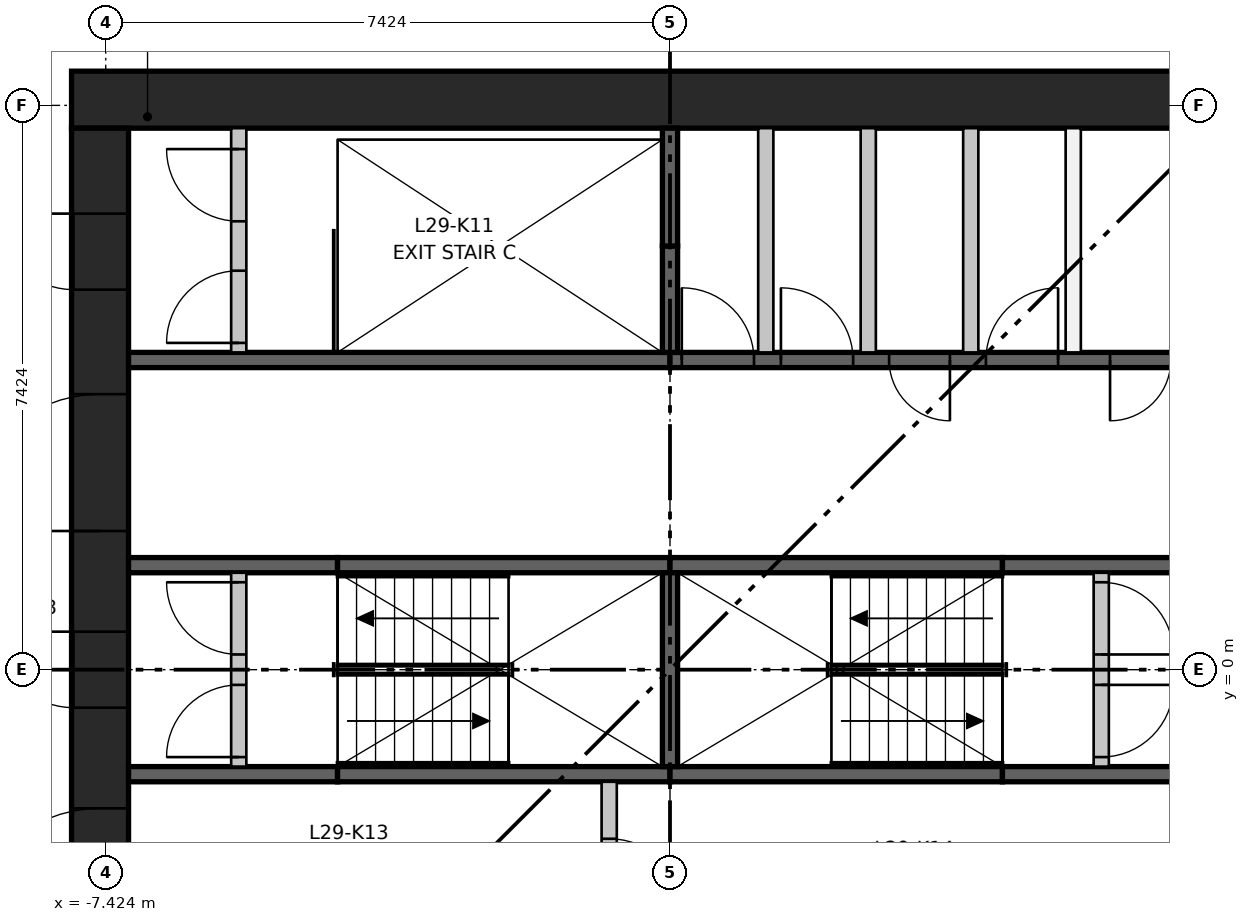
"""IFC4 building model, lengths in metres.
Left out: names, types, materials, properties, quantities, classifications, styles, units other than length and angle.
Written with IfcOpenShell. Run it as: python <this file> out.ifc"""

import sys

from ifc_helpers import new_model, si_unit, direction, frame, frame_2d, origin, place, context, subcontext, project, spatial, rectangle, extrude, element, fill, save


model = new_model("IFC4")
c1 = context("Model", 3, precision=1e-05, world=origin(), true_north=direction((0.0, 1.0)))
c2 = subcontext(c1, "Body", "Model", "MODEL_VIEW")
j1 = project(units=[si_unit("LENGTHUNIT", "METRE"), si_unit("PLANEANGLEUNIT", "RADIAN")], contexts=[c1])
p1 = place(None, origin())
s1 = spatial("IfcSite", under=j1, at=p1, CompositionType="ELEMENT")
p2 = place(p1, origin())
s2 = spatial("IfcBuilding", under=s1, at=p2, CompositionType="ELEMENT")
p3 = place(p2, frame((0.0, 0.0, 112.9)))
s3 = spatial("IfcBuildingStorey", under=s2, at=p3, CompositionType="ELEMENT", Elevation=112.9)
p4 = place(p3, frame((-7.874, 7.499, 0.0), z_axis=(0.0, 0.0, 1.0), x_axis=(1.0, 0.0, 0.0)))
e1 = element("IfcWall", 1, at=p4, inside=s3, PredefinedType="SHEAR", context=c2, shape_type="SweptSolid", body=[
    extrude(rectangle(XDim=15.748, YDim=0.75, at=frame_2d((7.874, 0.0))), origin(), (0.0, 0.0, 1.0), 3.65),
])
p5 = place(p3, frame((-7.499, -7.124, 0.0), z_axis=(0.0, 0.0, 1.0), x_axis=(0.0, 1.0, 0.0)))
e2 = element("IfcWall", 2, at=p5, inside=s3, PredefinedType="SHEAR", context=c2, shape_type="SweptSolid", body=[
    extrude(rectangle(XDim=14.248, YDim=0.75, at=frame_2d((7.124, 0.0))), origin(), (0.0, 0.0, 1.0), 3.65),
])
p6 = place(p5, frame((6.624, 0.0, 0.0)))
e3 = element("IfcOpeningElement", 3, at=p6, cuts=e2, PredefinedType="OPENING", context=c2, shape_type="SweptSolid", body=[
    extrude(rectangle(XDim=1.0, YDim=2.1, at=frame_2d((0.5, 1.05))), frame((0.0, 0.385, 0.0), z_axis=(0.0, -1.0, 0.0), x_axis=(1.0, 0.0, 0.0)), (0.0, 0.0, 1.0), 0.77),
])
p7 = place(p5, frame((3.5, 0.0, 0.0)))
e4 = element("IfcOpeningElement", 4, at=p7, cuts=e2, PredefinedType="OPENING", context=c2, shape_type="SweptSolid", body=[
    extrude(rectangle(XDim=1.8, YDim=2.1, at=frame_2d((0.9, 1.05))), frame((0.0, 0.385, 0.0), z_axis=(0.0, -1.0, 0.0), x_axis=(1.0, 0.0, 0.0)), (0.0, 0.0, 1.0), 0.77),
])
p8 = place(p5, frame((8.948, 0.0, 0.0)))
e5 = element("IfcOpeningElement", 5, at=p8, cuts=e2, PredefinedType="OPENING", context=c2, shape_type="SweptSolid", body=[
    extrude(rectangle(XDim=1.8, YDim=2.1, at=frame_2d((0.9, 1.05))), frame((0.0, 0.385, 0.0), z_axis=(0.0, -1.0, 0.0), x_axis=(1.0, 0.0, 0.0)), (0.0, 0.0, 1.0), 0.77),
])
p9 = place(p5, frame((12.124, 0.0, 0.0)))
e6 = element("IfcOpeningElement", 6, at=p9, cuts=e2, PredefinedType="OPENING", context=c2, shape_type="SweptSolid", body=[
    extrude(rectangle(XDim=1.0, YDim=2.1, at=frame_2d((0.5, 1.05))), frame((0.0, 0.385, 0.0), z_axis=(0.0, -1.0, 0.0), x_axis=(1.0, 0.0, 0.0)), (0.0, 0.0, 1.0), 0.77),
])
p10 = place(p3, frame((-7.124, 4.074, 0.0), z_axis=(0.0, 0.0, 1.0), x_axis=(1.0, 0.0, 0.0)))
e7 = element("IfcWall", 7, at=p10, inside=s3, PredefinedType="SHEAR", context=c2, shape_type="SweptSolid", body=[
    extrude(rectangle(XDim=7.124, YDim=0.2, at=frame_2d((3.562, 0.0))), origin(), (0.0, 0.0, 1.0), 3.3),
])
p11 = place(p3, frame((0.0, 4.074, 0.0), z_axis=(0.0, 0.0, 1.0), x_axis=(1.0, 0.0, 0.0)))
e8 = element("IfcWall", 8, at=p11, inside=s3, PredefinedType="SHEAR", context=c2, shape_type="SweptSolid", body=[
    extrude(rectangle(XDim=7.124, YDim=0.2, at=frame_2d((3.562, 0.0))), origin(), (0.0, 0.0, 1.0), 3.3),
])
p12 = place(p11, frame((0.155, 0.0, 0.0)))
e9 = element("IfcOpeningElement", 9, at=p12, cuts=e8, PredefinedType="OPENING", context=c2, shape_type="SweptSolid", body=[
    extrude(rectangle(XDim=0.95, YDim=2.1, at=frame_2d((0.475, 1.05))), frame((0.0, 0.11, 0.0), z_axis=(0.0, -1.0, 0.0), x_axis=(1.0, 0.0, 0.0)), (0.0, 0.0, 1.0), 0.22),
])
p13 = place(p11, frame((1.459, 0.0, 0.0)))
e10 = element("IfcOpeningElement", 10, at=p13, cuts=e8, PredefinedType="OPENING", context=c2, shape_type="SweptSolid", body=[
    extrude(rectangle(XDim=0.95, YDim=2.1, at=frame_2d((0.475, 1.05))), frame((0.0, 0.11, 0.0), z_axis=(0.0, -1.0, 0.0), x_axis=(1.0, 0.0, 0.0)), (0.0, 0.0, 1.0), 0.22),
])
p14 = place(p11, frame((2.883, 0.0, 0.0)))
e11 = element("IfcOpeningElement", 11, at=p14, cuts=e8, PredefinedType="OPENING", context=c2, shape_type="SweptSolid", body=[
    extrude(rectangle(XDim=0.8, YDim=2.1, at=frame_2d((0.4, 1.05))), frame((0.0, 0.11, 0.0), z_axis=(0.0, -1.0, 0.0), x_axis=(1.0, 0.0, 0.0)), (0.0, 0.0, 1.0), 0.22),
])
p15 = place(p11, frame((4.156, 0.0, 0.0)))
e12 = element("IfcOpeningElement", 12, at=p15, cuts=e8, PredefinedType="OPENING", context=c2, shape_type="SweptSolid", body=[
    extrude(rectangle(XDim=0.95, YDim=2.1, at=frame_2d((0.475, 1.05))), frame((0.0, 0.11, 0.0), z_axis=(0.0, -1.0, 0.0), x_axis=(1.0, 0.0, 0.0)), (0.0, 0.0, 1.0), 0.22),
])
p16 = place(p11, frame((5.79, 0.0, 0.0)))
e13 = element("IfcOpeningElement", 13, at=p16, cuts=e8, PredefinedType="OPENING", context=c2, shape_type="SweptSolid", body=[
    extrude(rectangle(XDim=0.8, YDim=2.1, at=frame_2d((0.4, 1.05))), frame((0.0, 0.11, 0.0), z_axis=(0.0, -1.0, 0.0), x_axis=(1.0, 0.0, 0.0)), (0.0, 0.0, 1.0), 0.22),
])
p17 = place(p3, frame((-7.124, -1.375, 0.0), z_axis=(0.0, 0.0, 1.0), x_axis=(1.0, 0.0, 0.0)))
e14 = element("IfcWall", 14, at=p17, inside=s3, PredefinedType="SHEAR", context=c2, shape_type="SweptSolid", body=[
    extrude(rectangle(XDim=2.75, YDim=0.2, at=frame_2d((1.375, 0.0))), origin(), (0.0, 0.0, 1.0), 3.3),
])
for number, where, z_axis, x_axis in (
    (15, (-4.374, -1.375, 0.0), (0.0, 0.0, 1.0), (1.0, 0.0, 0.0)),
    (16, (0.0, -1.375, 0.0), (0.0, 0.0, 1.0), (1.0, 0.0, 0.0)),
):
    element("IfcWall", number, at=place(p3, frame(where, z_axis=z_axis, x_axis=x_axis)), inside=s3, PredefinedType="SHEAR", context=c2, shape_type="SweptSolid", body=[
        extrude(rectangle(XDim=4.374, YDim=0.2, at=frame_2d((2.187, 0.0))), origin(), (0.0, 0.0, 1.0), 3.3),
    ])
for number, where, z_axis, x_axis in (
    (17, (4.374, -1.375, 0.0), (0.0, 0.0, 1.0), (1.0, 0.0, 0.0)),
    (18, (-7.124, 1.375, 0.0), (0.0, 0.0, 1.0), (1.0, 0.0, 0.0)),
):
    element("IfcWall", number, at=place(p3, frame(where, z_axis=z_axis, x_axis=x_axis)), inside=s3, PredefinedType="SHEAR", context=c2, shape_type="SweptSolid", body=[
        extrude(rectangle(XDim=2.75, YDim=0.2, at=frame_2d((1.375, 0.0))), origin(), (0.0, 0.0, 1.0), 3.3),
    ])
for number, where, z_axis, x_axis in (
    (19, (-4.374, 1.375, 0.0), (0.0, 0.0, 1.0), (1.0, 0.0, 0.0)),
    (20, (0.0, 1.375, 0.0), (0.0, 0.0, 1.0), (1.0, 0.0, 0.0)),
):
    element("IfcWall", number, at=place(p3, frame(where, z_axis=z_axis, x_axis=x_axis)), inside=s3, PredefinedType="SHEAR", context=c2, shape_type="SweptSolid", body=[
        extrude(rectangle(XDim=4.374, YDim=0.2, at=frame_2d((2.187, 0.0))), origin(), (0.0, 0.0, 1.0), 3.3),
    ])
p18 = place(p3, frame((4.374, 1.375, 0.0), z_axis=(0.0, 0.0, 1.0), x_axis=(1.0, 0.0, 0.0)))
e21 = element("IfcWall", 21, at=p18, inside=s3, PredefinedType="SHEAR", context=c2, shape_type="SweptSolid", body=[
    extrude(rectangle(XDim=2.75, YDim=0.2, at=frame_2d((1.375, 0.0))), origin(), (0.0, 0.0, 1.0), 3.3),
])
p19 = place(p3, frame((0.0, -1.275, 0.0), z_axis=(0.0, 0.0, 1.0), x_axis=(0.0, 1.0, 0.0)))
e22 = element("IfcWall", 22, at=p19, inside=s3, PredefinedType="SHEAR", context=c2, shape_type="SweptSolid", body=[
    extrude(rectangle(XDim=2.55, YDim=0.2, at=frame_2d((1.275, 0.0))), origin(), (0.0, 0.0, 1.0), 3.3),
])
p20 = place(p3, frame((-0.8, -3.974, 0.0), z_axis=(0.0, 0.0, 1.0), x_axis=(0.0, 1.0, 0.0)))
e23 = element("IfcWall", 23, at=p20, inside=s3, PredefinedType="PARTITIONING", context=c2, shape_type="SweptSolid", body=[
    extrude(rectangle(XDim=2.499, YDim=0.2, at=frame_2d((1.25, 0.0))), origin(), (0.0, 0.0, 1.0), 3.3),
])
p21 = place(p20, frame((0.75, 0.0, 0.0)))
e24 = element("IfcOpeningElement", 24, at=p21, cuts=e23, PredefinedType="OPENING", context=c2, shape_type="SweptSolid", body=[
    extrude(rectangle(XDim=1.0, YDim=2.1, at=frame_2d((0.5, 1.05))), frame((0.0, 0.11, 0.0), z_axis=(0.0, -1.0, 0.0), x_axis=(1.0, 0.0, 0.0)), (0.0, 0.0, 1.0), 0.22),
])
p22 = place(p3, frame((0.0, 4.174, 0.0), z_axis=(0.0, 0.0, 1.0), x_axis=(0.0, 1.0, 0.0)))
e25 = element("IfcWall", 25, at=p22, inside=s3, PredefinedType="SHEAR", context=c2, shape_type="SweptSolid", body=[
    extrude(rectangle(XDim=1.4, YDim=0.2, at=frame_2d((0.7, 0.0))), origin(), (0.0, 0.0, 1.0), 3.3),
])
p23 = place(p3, frame((0.0, 5.574, 0.0), z_axis=(0.0, 0.0, 1.0), x_axis=(0.0, 1.0, 0.0)))
e26 = element("IfcWall", 26, at=p23, inside=s3, PredefinedType="SHEAR", context=c2, shape_type="SweptSolid", body=[
    extrude(rectangle(XDim=1.55, YDim=0.2, at=frame_2d((0.775, 0.0))), origin(), (0.0, 0.0, 1.0), 3.3),
])
for number, where, z_axis, x_axis in (
    (27, (1.26, 4.174, 0.0), (0.0, 0.0, 1.0), (0.0, 1.0, 0.0)),
    (28, (2.609, 4.174, 0.0), (0.0, 0.0, 1.0), (0.0, 1.0, 0.0)),
    (29, (3.957, 4.174, 0.0), (0.0, 0.0, 1.0), (0.0, 1.0, 0.0)),
    (30, (5.305, 4.174, 0.0), (0.0, 0.0, 1.0), (0.0, 1.0, 0.0)),
):
    element("IfcWall", number, at=place(p3, frame(where, z_axis=z_axis, x_axis=x_axis)), inside=s3, PredefinedType="PARTITIONING", context=c2, shape_type="SweptSolid", body=[
        extrude(rectangle(XDim=2.95, YDim=0.2, at=frame_2d((1.475, 0.0))), origin(), (0.0, 0.0, 1.0), 3.3),
    ])
p24 = place(p3, frame((-5.674, -1.275, 0.0), z_axis=(0.0, 0.0, 1.0), x_axis=(0.0, 1.0, 0.0)))
e31 = element("IfcWall", 31, at=p24, inside=s3, PredefinedType="PARTITIONING", context=c2, shape_type="SweptSolid", body=[
    extrude(rectangle(XDim=2.55, YDim=0.2, at=frame_2d((1.275, 0.0))), origin(), (0.0, 0.0, 1.0), 3.3),
])
p25 = place(p24, frame((0.125, 0.0, 0.0)))
e32 = element("IfcOpeningElement", 32, at=p25, cuts=e31, PredefinedType="OPENING", context=c2, shape_type="SweptSolid", body=[
    extrude(rectangle(XDim=0.95, YDim=2.1, at=frame_2d((0.475, 1.05))), frame((0.0, 0.11, 0.0), z_axis=(0.0, -1.0, 0.0), x_axis=(1.0, 0.0, 0.0)), (0.0, 0.0, 1.0), 0.22),
])
p26 = place(p24, frame((1.475, 0.0, 0.0)))
e33 = element("IfcOpeningElement", 33, at=p26, cuts=e31, PredefinedType="OPENING", context=c2, shape_type="SweptSolid", body=[
    extrude(rectangle(XDim=0.95, YDim=2.1, at=frame_2d((0.475, 1.05))), frame((0.0, 0.11, 0.0), z_axis=(0.0, -1.0, 0.0), x_axis=(1.0, 0.0, 0.0)), (0.0, 0.0, 1.0), 0.22),
])
p27 = place(p3, frame((5.674, -1.275, 0.0), z_axis=(0.0, 0.0, 1.0), x_axis=(0.0, 1.0, 0.0)))
e34 = element("IfcWall", 34, at=p27, inside=s3, PredefinedType="PARTITIONING", context=c2, shape_type="SweptSolid", body=[
    extrude(rectangle(XDim=2.55, YDim=0.2, at=frame_2d((1.275, 0.0))), origin(), (0.0, 0.0, 1.0), 3.3),
])
p28 = place(p27, frame((0.125, 0.0, 0.0)))
e35 = element("IfcOpeningElement", 35, at=p28, cuts=e34, PredefinedType="OPENING", context=c2, shape_type="SweptSolid", body=[
    extrude(rectangle(XDim=0.95, YDim=2.1, at=frame_2d((0.475, 1.05))), frame((0.0, 0.11, 0.0), z_axis=(0.0, -1.0, 0.0), x_axis=(1.0, 0.0, 0.0)), (0.0, 0.0, 1.0), 0.22),
])
p29 = place(p27, frame((1.475, 0.0, 0.0)))
e36 = element("IfcOpeningElement", 36, at=p29, cuts=e34, PredefinedType="OPENING", context=c2, shape_type="SweptSolid", body=[
    extrude(rectangle(XDim=0.95, YDim=2.1, at=frame_2d((0.475, 1.05))), frame((0.0, 0.11, 0.0), z_axis=(0.0, -1.0, 0.0), x_axis=(1.0, 0.0, 0.0)), (0.0, 0.0, 1.0), 0.22),
])
p30 = place(p3, frame((-5.674, 4.174, 0.0), z_axis=(0.0, 0.0, 1.0), x_axis=(0.0, 1.0, 0.0)))
e37 = element("IfcWall", 37, at=p30, inside=s3, PredefinedType="PARTITIONING", context=c2, shape_type="SweptSolid", body=[
    extrude(rectangle(XDim=2.95, YDim=0.2, at=frame_2d((1.475, 0.0))), origin(), (0.0, 0.0, 1.0), 3.3),
])
p31 = place(p30, frame((0.125, 0.0, 0.0)))
e38 = element("IfcOpeningElement", 38, at=p31, cuts=e37, PredefinedType="OPENING", context=c2, shape_type="SweptSolid", body=[
    extrude(rectangle(XDim=0.95, YDim=2.1, at=frame_2d((0.475, 1.05))), frame((0.0, 0.11, 0.0), z_axis=(0.0, -1.0, 0.0), x_axis=(1.0, 0.0, 0.0)), (0.0, 0.0, 1.0), 0.22),
])
p32 = place(p30, frame((1.725, 0.0, 0.0)))
e39 = element("IfcOpeningElement", 39, at=p32, cuts=e37, PredefinedType="OPENING", context=c2, shape_type="SweptSolid", body=[
    extrude(rectangle(XDim=0.95, YDim=2.1, at=frame_2d((0.475, 1.05))), frame((0.0, 0.11, 0.0), z_axis=(0.0, -1.0, 0.0), x_axis=(1.0, 0.0, 0.0)), (0.0, 0.0, 1.0), 0.22),
])
p33 = place(p25, origin())
e40 = element("IfcDoor", 40, at=p33, inside=s3, OperationType="SINGLE_SWING_LEFT", PredefinedType="DOOR", context=c2, shape_type="SweptSolid", body=[
    extrude(rectangle(XDim=0.95, YDim=2.1, at=frame_2d((0.475, 1.05))), frame((0.0, 0.025, 0.0), z_axis=(0.0, -1.0, 0.0), x_axis=(1.0, 0.0, 0.0)), (0.0, 0.0, 1.0), 0.05),
])
fill(e32, e40)
p34 = place(p26, origin())
e41 = element("IfcDoor", 41, at=p34, inside=s3, OperationType="SINGLE_SWING_RIGHT", PredefinedType="DOOR", context=c2, shape_type="SweptSolid", body=[
    extrude(rectangle(XDim=0.95, YDim=2.1, at=frame_2d((0.475, 1.05))), frame((0.0, 0.025, 0.0), z_axis=(0.0, -1.0, 0.0), x_axis=(1.0, 0.0, 0.0)), (0.0, 0.0, 1.0), 0.05),
])
fill(e33, e41)
p35 = place(p28, frame((0.95, 0.0, 0.0), z_axis=(0.0, 0.0, 1.0), x_axis=(-1.0, 0.0, 0.0)))
e42 = element("IfcDoor", 42, at=p35, inside=s3, OperationType="SINGLE_SWING_RIGHT", PredefinedType="DOOR", context=c2, shape_type="SweptSolid", body=[
    extrude(rectangle(XDim=0.95, YDim=2.1, at=frame_2d((0.475, 1.05))), frame((0.0, 0.025, 0.0), z_axis=(0.0, -1.0, 0.0), x_axis=(1.0, 0.0, 0.0)), (0.0, 0.0, 1.0), 0.05),
])
fill(e35, e42)
p36 = place(p29, frame((0.95, 0.0, 0.0), z_axis=(0.0, 0.0, 1.0), x_axis=(-1.0, 0.0, 0.0)))
e43 = element("IfcDoor", 43, at=p36, inside=s3, OperationType="SINGLE_SWING_LEFT", PredefinedType="DOOR", context=c2, shape_type="SweptSolid", body=[
    extrude(rectangle(XDim=0.95, YDim=2.1, at=frame_2d((0.475, 1.05))), frame((0.0, 0.025, 0.0), z_axis=(0.0, -1.0, 0.0), x_axis=(1.0, 0.0, 0.0)), (0.0, 0.0, 1.0), 0.05),
])
fill(e36, e43)
p37 = place(p31, origin())
e44 = element("IfcDoor", 44, at=p37, inside=s3, OperationType="SINGLE_SWING_LEFT", PredefinedType="DOOR", context=c2, shape_type="SweptSolid", body=[
    extrude(rectangle(XDim=0.95, YDim=2.1, at=frame_2d((0.475, 1.05))), frame((0.0, 0.025, 0.0), z_axis=(0.0, -1.0, 0.0), x_axis=(1.0, 0.0, 0.0)), (0.0, 0.0, 1.0), 0.05),
])
fill(e38, e44)
p38 = place(p32, origin())
e45 = element("IfcDoor", 45, at=p38, inside=s3, OperationType="SINGLE_SWING_RIGHT", PredefinedType="DOOR", context=c2, shape_type="SweptSolid", body=[
    extrude(rectangle(XDim=0.95, YDim=2.1, at=frame_2d((0.475, 1.05))), frame((0.0, 0.025, 0.0), z_axis=(0.0, -1.0, 0.0), x_axis=(1.0, 0.0, 0.0)), (0.0, 0.0, 1.0), 0.05),
])
fill(e39, e45)
p39 = place(p21, frame((1.0, 0.0, 0.0), z_axis=(0.0, 0.0, 1.0), x_axis=(-1.0, 0.0, 0.0)))
e46 = element("IfcDoor", 46, at=p39, inside=s3, OperationType="SINGLE_SWING_LEFT", PredefinedType="DOOR", context=c2, shape_type="SweptSolid", body=[
    extrude(rectangle(XDim=1.0, YDim=2.1, at=frame_2d((0.5, 1.05))), frame((0.0, 0.025, 0.0), z_axis=(0.0, -1.0, 0.0), x_axis=(1.0, 0.0, 0.0)), (0.0, 0.0, 1.0), 0.05),
])
fill(e24, e46)
p40 = place(p12, origin())
e47 = element("IfcDoor", 47, at=p40, inside=s3, OperationType="SINGLE_SWING_LEFT", PredefinedType="DOOR", context=c2, shape_type="SweptSolid", body=[
    extrude(rectangle(XDim=0.95, YDim=2.1, at=frame_2d((0.475, 1.05))), frame((0.0, 0.025, 0.0), z_axis=(0.0, -1.0, 0.0), x_axis=(1.0, 0.0, 0.0)), (0.0, 0.0, 1.0), 0.05),
])
fill(e9, e47)
p41 = place(p13, origin())
e48 = element("IfcDoor", 48, at=p41, inside=s3, OperationType="SINGLE_SWING_LEFT", PredefinedType="DOOR", context=c2, shape_type="SweptSolid", body=[
    extrude(rectangle(XDim=0.95, YDim=2.1, at=frame_2d((0.475, 1.05))), frame((0.0, 0.025, 0.0), z_axis=(0.0, -1.0, 0.0), x_axis=(1.0, 0.0, 0.0)), (0.0, 0.0, 1.0), 0.05),
])
fill(e10, e48)
p42 = place(p14, frame((0.8, 0.0, 0.0), z_axis=(0.0, 0.0, 1.0), x_axis=(-1.0, 0.0, 0.0)))
e49 = element("IfcDoor", 49, at=p42, inside=s3, OperationType="SINGLE_SWING_RIGHT", PredefinedType="DOOR", context=c2, shape_type="SweptSolid", body=[
    extrude(rectangle(XDim=0.8, YDim=2.1, at=frame_2d((0.4, 1.05))), frame((0.0, 0.025, 0.0), z_axis=(0.0, -1.0, 0.0), x_axis=(1.0, 0.0, 0.0)), (0.0, 0.0, 1.0), 0.05),
])
fill(e11, e49)
p43 = place(p15, origin())
e50 = element("IfcDoor", 50, at=p43, inside=s3, OperationType="SINGLE_SWING_RIGHT", PredefinedType="DOOR", context=c2, shape_type="SweptSolid", body=[
    extrude(rectangle(XDim=0.95, YDim=2.1, at=frame_2d((0.475, 1.05))), frame((0.0, 0.025, 0.0), z_axis=(0.0, -1.0, 0.0), x_axis=(1.0, 0.0, 0.0)), (0.0, 0.0, 1.0), 0.05),
])
fill(e12, e50)
p44 = place(p16, frame((0.8, 0.0, 0.0), z_axis=(0.0, 0.0, 1.0), x_axis=(-1.0, 0.0, 0.0)))
e51 = element("IfcDoor", 51, at=p44, inside=s3, OperationType="SINGLE_SWING_LEFT", PredefinedType="DOOR", context=c2, shape_type="SweptSolid", body=[
    extrude(rectangle(XDim=0.8, YDim=2.1, at=frame_2d((0.4, 1.05))), frame((0.0, 0.025, 0.0), z_axis=(0.0, -1.0, 0.0), x_axis=(1.0, 0.0, 0.0)), (0.0, 0.0, 1.0), 0.05),
])
fill(e13, e51)
p45 = place(p6, origin())
e52 = element("IfcDoor", 52, at=p45, inside=s3, OperationType="SINGLE_SWING_RIGHT", PredefinedType="DOOR", context=c2, shape_type="SweptSolid", body=[
    extrude(rectangle(XDim=1.0, YDim=2.1, at=frame_2d((0.5, 1.05))), frame((0.0, 0.375, 0.0), z_axis=(0.0, -1.0, 0.0), x_axis=(1.0, 0.0, 0.0)), (0.0, 0.0, 1.0), 0.05),
])
fill(e3, e52)
p46 = place(p7, origin())
e53 = element("IfcDoor", 53, at=p46, inside=s3, OperationType="DOUBLE_DOOR_SINGLE_SWING", PredefinedType="DOOR", context=c2, shape_type="SweptSolid", body=[
    extrude(rectangle(XDim=1.8, YDim=2.1, at=frame_2d((0.9, 1.05))), frame((0.0, 0.025, 0.0), z_axis=(0.0, -1.0, 0.0), x_axis=(1.0, 0.0, 0.0)), (0.0, 0.0, 1.0), 0.05),
])
fill(e4, e53)
p47 = place(p8, origin())
e54 = element("IfcDoor", 54, at=p47, inside=s3, OperationType="DOUBLE_DOOR_SINGLE_SWING", PredefinedType="DOOR", context=c2, shape_type="SweptSolid", body=[
    extrude(rectangle(XDim=1.8, YDim=2.1, at=frame_2d((0.9, 1.05))), frame((0.0, 0.025, 0.0), z_axis=(0.0, -1.0, 0.0), x_axis=(1.0, 0.0, 0.0)), (0.0, 0.0, 1.0), 0.05),
])
fill(e5, e54)
p48 = place(p9, origin())
e55 = element("IfcDoor", 55, at=p48, inside=s3, OperationType="SINGLE_SWING_RIGHT", PredefinedType="DOOR", context=c2, shape_type="SweptSolid", body=[
    extrude(rectangle(XDim=1.0, YDim=2.1, at=frame_2d((0.5, 1.05))), frame((0.0, 0.375, 0.0), z_axis=(0.0, -1.0, 0.0), x_axis=(1.0, 0.0, 0.0)), (0.0, 0.0, 1.0), 0.05),
])
fill(e6, e55)
save(model, sys.argv[1])
